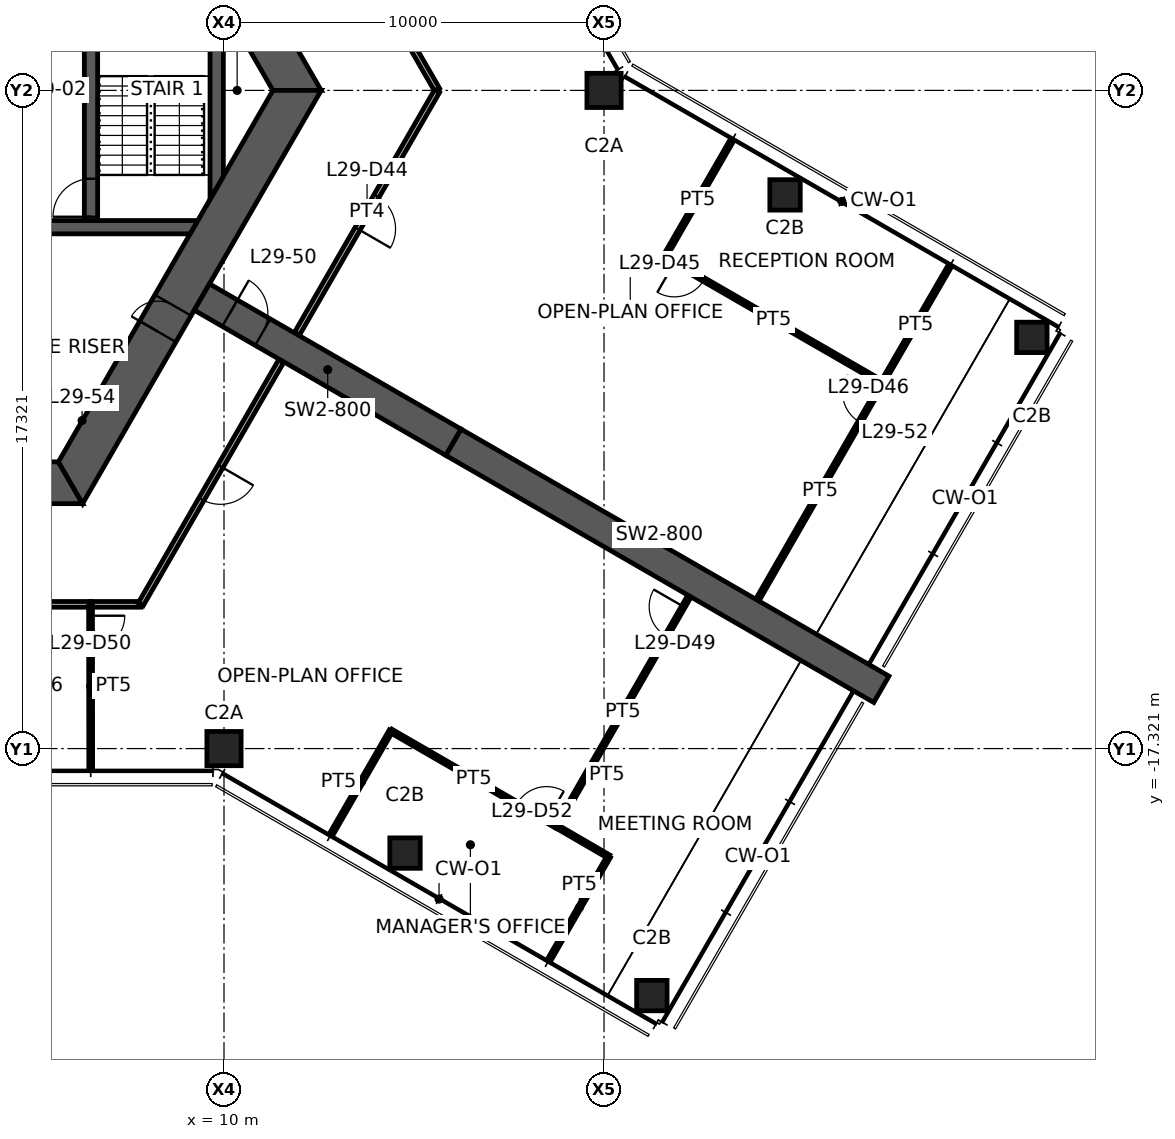
"""IFC4 building model, lengths in metres.
Left out: names, types, materials, properties, quantities, classifications, styles, units other than length and angle.
Written with IfcOpenShell. Run it as: python <this file> out.ifc"""

import sys

from ifc_helpers import new_model, si_unit, direction, frame, frame_2d, origin, origin_2d, place, context, subcontext, project, spatial, polyline, rectangle, hollow_rectangle, outline, extrude, element, fill, save


model = new_model("IFC4")
c1 = context("Model", 3, precision=1e-05, world=origin(), true_north=direction((0.0, 1.0)))
c2 = subcontext(c1, "Body", "Model", "MODEL_VIEW")
j1 = project(units=[si_unit("LENGTHUNIT", "METRE"), si_unit("PLANEANGLEUNIT", "RADIAN")], contexts=[c1])
p1 = place(None, origin())
s1 = spatial("IfcSite", under=j1, at=p1, CompositionType="ELEMENT")
p2 = place(p1, origin())
s2 = spatial("IfcBuilding", under=s1, at=p2, CompositionType="ELEMENT")
p3 = place(p2, frame((0.0, 0.0, 115.8)))
s3 = spatial("IfcBuildingStorey", under=s2, at=p3, CompositionType="ELEMENT", Elevation=115.8)
for number, where, z_axis, x_axis in (
    (1, (20.0, 0.0, 0.0), (0.0, 0.0, 1.0), (1.0, 0.0, 0.0)),
    (2, (10.0, -17.321, 0.0), (0.0, 0.0, 1.0), (1.0, 0.0, 0.0)),
):
    element("IfcColumn", number, at=place(p3, frame(where, z_axis=z_axis, x_axis=x_axis)), inside=s3, PredefinedType="COLUMN", context=c2, shape_type="SweptSolid", body=[
        extrude(hollow_rectangle(XDim=0.9, YDim=0.9, WallThickness=0.055, at=origin_2d()), origin(), (0.0, 0.0, 1.0), 3.9),
    ])
for number, where, z_axis, x_axis in (
    (3, (14.763, -20.071, 0.0), (0.0, 0.0, 1.0), (1.0, 0.0, 0.0)),
    (4, (21.258, -23.821, 0.0), (0.0, 0.0, 1.0), (1.0, 0.0, 0.0)),
    (5, (24.763, -2.75, 0.0), (0.0, 0.0, 1.0), (1.0, 0.0, 0.0)),
    (6, (31.258, -6.5, 0.0), (0.0, 0.0, 1.0), (1.0, 0.0, 0.0)),
):
    element("IfcColumn", number, at=place(p3, frame(where, z_axis=z_axis, x_axis=x_axis)), inside=s3, PredefinedType="COLUMN", context=c2, shape_type="SweptSolid", body=[
        extrude(hollow_rectangle(XDim=0.8, YDim=0.8, WallThickness=0.045, at=origin_2d()), origin(), (0.0, 0.0, 1.0), 3.9),
    ])
p4 = place(p3, frame((11.922, 0.0, 0.0), z_axis=(0.0, 0.0, 1.0), x_axis=(-0.500004296715, 0.866022923061, 0.0)))
e7 = element("IfcWall", 7, at=p4, inside=s3, PredefinedType="SHEAR", context=c2, shape_type="SweptSolid", body=[
    extrude(outline(polyline([(-0.318, -0.55), (5.835, -0.55), (6.635, -0.55), (12.24, -0.55), (11.605, 0.55), (6.635, 0.55), (5.835, 0.55), (0.318, 0.55), (-0.318, -0.55)])), origin(), (0.0, 0.0, 1.0), 3.9),
])
p5 = place(p4, frame((5.835, 0.0, 0.0)))
e8 = element("IfcOpeningElement", 8, at=p5, cuts=e7, PredefinedType="OPENING", context=c2, shape_type="SweptSolid", body=[
    extrude(rectangle(XDim=0.8, YDim=2.1, at=frame_2d((0.4, 1.05))), frame((0.0, 0.56, 0.0), z_axis=(0.0, -1.0, 0.0), x_axis=(1.0, 0.0, 0.0)), (0.0, 0.0, 1.0), 1.12),
])
p6 = place(p3, frame((-5.961, -10.325, 0.0), z_axis=(0.0, 0.0, 1.0), x_axis=(1.0, 0.0, 0.0)))
e9 = element("IfcWall", 9, at=p6, inside=s3, PredefinedType="SHEAR", context=c2, shape_type="SweptSolid", body=[
    extrude(outline(polyline([(-0.318, -0.55), (5.461, -0.55), (6.461, -0.55), (12.24, -0.55), (11.605, 0.55), (6.461, 0.55), (5.461, 0.55), (0.318, 0.55), (-0.318, -0.55)])), origin(), (0.0, 0.0, 1.0), 3.9),
])
p7 = place(p6, frame((5.461, 0.0, 0.0)))
e10 = element("IfcOpeningElement", 10, at=p7, cuts=e9, PredefinedType="OPENING", context=c2, shape_type="SweptSolid", body=[
    extrude(rectangle(XDim=1.0, YDim=2.1, at=frame_2d((0.5, 1.05))), frame((0.0, 0.56, 0.0), z_axis=(0.0, -1.0, 0.0), x_axis=(1.0, 0.0, 0.0)), (0.0, 0.0, 1.0), 1.12),
])
p8 = place(p3, frame((5.961, -10.325, 0.0), z_axis=(0.0, 0.0, 1.0), x_axis=(0.500004296715, 0.866022923061, 0.0)))
e11 = element("IfcWall", 11, at=p8, inside=s3, PredefinedType="SHEAR", context=c2, shape_type="SweptSolid", body=[
    extrude(outline(polyline([(-0.318, -0.55), (4.594, -0.55), (5.394, -0.55), (12.24, -0.55), (11.605, 0.55), (5.394, 0.55), (4.594, 0.55), (0.318, 0.55), (-0.318, -0.55)])), origin(), (0.0, 0.0, 1.0), 3.9),
])
p9 = place(p8, frame((4.594, 0.0, 0.0)))
e12 = element("IfcOpeningElement", 12, at=p9, cuts=e11, PredefinedType="OPENING", context=c2, shape_type="SweptSolid", body=[
    extrude(rectangle(XDim=0.8, YDim=2.1, at=frame_2d((0.4, 1.05))), frame((0.0, 0.56, 0.0), z_axis=(0.0, -1.0, 0.0), x_axis=(1.0, 0.0, 0.0)), (0.0, 0.0, 1.0), 1.12),
])
p10 = place(p3, frame((9.418, -5.438, 0.0), z_axis=(0.0, 0.0, 1.0), x_axis=(0.866029782078, -0.499992416496, 0.0)))
e13 = element("IfcWall", 13, at=p10, inside=s3, PredefinedType="SHEAR", context=c2, shape_type="SweptSolid", body=[
    extrude(rectangle(XDim=7.646, YDim=0.8, at=frame_2d((3.823, 0.0))), origin(), (0.0, 0.0, 1.0), 3.9),
])
p11 = place(p10, frame((0.85, 0.0, 0.0)))
e14 = element("IfcOpeningElement", 14, at=p11, cuts=e13, PredefinedType="OPENING", context=c2, shape_type="SweptSolid", body=[
    extrude(rectangle(XDim=1.0, YDim=2.1, at=frame_2d((0.5, 1.05))), frame((0.0, 0.41, 0.0), z_axis=(0.0, -1.0, 0.0), x_axis=(1.0, 0.0, 0.0)), (0.0, 0.0, 1.0), 0.82),
])
p12 = place(p3, frame((16.039, -9.26, 0.0), z_axis=(0.0, 0.0, 1.0), x_axis=(0.866024837091, -0.50000098154, 0.0)))
e15 = element("IfcWall", 15, at=p12, inside=s3, PredefinedType="SHEAR", context=c2, shape_type="SweptSolid", body=[
    extrude(rectangle(XDim=13.0, YDim=0.8, at=frame_2d((6.5, 0.0))), origin(), (0.0, 0.0, 1.0), 3.9),
])
p13 = place(p3, frame((1.425, -3.6, 0.0), z_axis=(0.0, 0.0, 1.0), x_axis=(1.0, 0.0, 0.0)))
e16 = element("IfcWall", 16, at=p13, inside=s3, PredefinedType="SHEAR", context=c2, shape_type="SweptSolid", body=[
    extrude(outline(polyline([(0.0, -0.175), (1.075, -0.175), (2.175, -0.175), (7.683, -0.175), (7.885, 0.175), (2.175, 0.175), (1.075, 0.175), (0.0, 0.175), (0.0, -0.175)])), origin(), (0.0, 0.0, 1.0), 3.9),
])
p14 = place(p13, frame((1.075, 0.0, 0.0)))
e17 = element("IfcOpeningElement", 17, at=p14, cuts=e16, PredefinedType="OPENING", context=c2, shape_type="SweptSolid", body=[
    extrude(rectangle(XDim=1.1, YDim=2.1, at=frame_2d((0.55, 1.05))), frame((0.0, 0.185, 0.0), z_axis=(0.0, -1.0, 0.0), x_axis=(1.0, 0.0, 0.0)), (0.0, 0.0, 1.0), 0.37),
])
p15 = place(p3, frame((6.5, -3.425, 0.0), z_axis=(0.0, 0.0, 1.0), x_axis=(0.0, 1.0, 0.0)))
e18 = element("IfcWall", 18, at=p15, inside=s3, PredefinedType="SHEAR", context=c2, shape_type="SweptSolid", body=[
    extrude(rectangle(XDim=6.85, YDim=0.35, at=frame_2d((3.425, 0.0))), origin(), (0.0, 0.0, 1.0), 3.9),
])
p16 = place(p15, frame((0.1, 0.0, 0.0)))
e19 = element("IfcOpeningElement", 19, at=p16, cuts=e18, PredefinedType="OPENING", context=c2, shape_type="SweptSolid", body=[
    extrude(rectangle(XDim=1.0, YDim=2.1, at=frame_2d((0.5, 1.05))), frame((0.0, 0.185, 0.0), z_axis=(0.0, -1.0, 0.0), x_axis=(1.0, 0.0, 0.0)), (0.0, 0.0, 1.0), 0.37),
])
p17 = place(p3, frame((9.808, -2.562, 0.0), z_axis=(0.0, 0.0, 1.0), x_axis=(0.0, 1.0, 0.0)))
e20 = element("IfcWall", 20, at=p17, inside=s3, PredefinedType="SHEAR", context=c2, shape_type="SweptSolid", body=[
    extrude(outline(polyline([(0.303, -0.175), (4.821, -0.175), (5.428, 0.175), (-0.303, 0.175), (0.303, -0.175)])), origin(), (0.0, 0.0, 1.0), 3.9),
])
p18 = place(p3, frame((13.334, 3.955, 0.0), z_axis=(0.0, 0.0, 1.0), x_axis=(0.499987549055, -0.866032592222, 0.0)))
e21 = element("IfcWall", 21, at=p18, inside=s3, PredefinedType="PARTITIONING", context=c2, shape_type="SweptSolid", body=[
    extrude(rectangle(XDim=4.544, YDim=0.15, at=frame_2d((2.272, 0.0))), origin(), (0.0, 0.0, 1.0), 2.95),
])
p19 = place(p3, frame((15.606, -0.02, 0.0), z_axis=(0.0, 0.0, 1.0), x_axis=(-0.499989298045, -0.866031582473, 0.0)))
e22 = element("IfcWall", 22, at=p19, inside=s3, PredefinedType="PARTITIONING", context=c2, shape_type="SweptSolid", body=[
    extrude(rectangle(XDim=7.365, YDim=0.15, at=frame_2d((3.683, 0.0))), origin(), (0.0, 0.0, 1.0), 2.95),
])
p20 = place(p19, frame((3.183, 0.0, 0.0)))
e23 = element("IfcOpeningElement", 23, at=p20, cuts=e22, PredefinedType="OPENING", context=c2, shape_type="SweptSolid", body=[
    extrude(rectangle(XDim=1.0, YDim=2.1, at=frame_2d((0.5, 1.05))), frame((0.0, 0.085, 0.0), z_axis=(0.0, -1.0, 0.0), x_axis=(1.0, 0.0, 0.0)), (0.0, 0.0, 1.0), 0.17),
])
p21 = place(p3, frame((29.075, -4.662, 0.0), z_axis=(0.0, 0.0, 1.0), x_axis=(-0.501335959492, -0.865252712056, 0.0)))
e24 = element("IfcWall", 24, at=p21, inside=s3, PredefinedType="PARTITIONING", context=c2, shape_type="SweptSolid", body=[
    extrude(rectangle(XDim=3.5, YDim=0.1, at=frame_2d((1.75, 0.0))), origin(), (0.0, 0.0, 1.0), 2.95),
])
p22 = place(p3, frame((21.592, -4.383, 0.0), z_axis=(0.0, 0.0, 1.0), x_axis=(0.500009906705, 0.86601968407, 0.0)))
e25 = element("IfcWall", 25, at=p22, inside=s3, PredefinedType="PARTITIONING", context=c2, shape_type="SweptSolid", body=[
    extrude(rectangle(XDim=3.48, YDim=0.1, at=frame_2d((1.74, 0.0))), origin(), (0.0, 0.0, 1.0), 2.95),
])
p23 = place(p3, frame((27.327, -7.69, 0.0), z_axis=(0.0, 0.0, 1.0), x_axis=(-0.866318796728, 0.499491483847, 0.0)))
e26 = element("IfcWall", 26, at=p23, inside=s3, PredefinedType="PARTITIONING", context=c2, shape_type="SweptSolid", body=[
    extrude(rectangle(XDim=6.62, YDim=0.1, at=frame_2d((3.31, 0.0))), origin(), (0.0, 0.0, 1.0), 2.95),
])
p24 = place(p23, frame((5.42, 0.0, 0.0)))
e27 = element("IfcOpeningElement", 27, at=p24, cuts=e26, PredefinedType="OPENING", context=c2, shape_type="SweptSolid", body=[
    extrude(rectangle(XDim=0.9, YDim=2.1, at=frame_2d((0.45, 1.05))), frame((0.0, 0.06, 0.0), z_axis=(0.0, -1.0, 0.0), x_axis=(1.0, 0.0, 0.0)), (0.0, 0.0, 1.0), 0.12),
])
p25 = place(p3, frame((24.043, -13.396, 0.0), z_axis=(0.0, 0.0, 1.0), x_axis=(0.498632747728, 0.866813349512, 0.0)))
e28 = element("IfcWall", 28, at=p25, inside=s3, PredefinedType="PARTITIONING", context=c2, shape_type="SweptSolid", body=[
    extrude(rectangle(XDim=6.584, YDim=0.1, at=frame_2d((3.292, 0.0))), origin(), (0.0, 0.0, 1.0), 2.95),
])
p26 = place(p25, frame((5.384, 0.0, 0.0)))
e29 = element("IfcOpeningElement", 29, at=p26, cuts=e28, PredefinedType="OPENING", context=c2, shape_type="SweptSolid", body=[
    extrude(rectangle(XDim=0.9, YDim=2.1, at=frame_2d((0.45, 1.05))), frame((0.0, 0.06, 0.0), z_axis=(0.0, -1.0, 0.0), x_axis=(1.0, 0.0, 0.0)), (0.0, 0.0, 1.0), 0.12),
])
p27 = place(p3, frame((6.498, -13.525, 0.0), z_axis=(0.0, 0.0, 1.0), x_axis=(-1.0, 0.0, 0.0)))
e30 = element("IfcWall", 30, at=p27, inside=s3, PredefinedType="PARTITIONING", context=c2, shape_type="SweptSolid", body=[
    extrude(rectangle(XDim=3.256, YDim=0.15, at=frame_2d((1.628, 0.0))), origin(), (0.0, 0.0, 1.0), 2.95),
])
p28 = place(p3, frame((7.809, -13.525, 0.0), z_axis=(0.0, 0.0, 1.0), x_axis=(-1.0, 0.0, 0.0)))
e31 = element("IfcWall", 31, at=p28, inside=s3, PredefinedType="PARTITIONING", context=c2, shape_type="SweptSolid", body=[
    extrude(rectangle(XDim=1.32, YDim=0.15, at=frame_2d((0.66, 0.0))), origin(), (0.0, 0.0, 1.0), 2.95),
])
p29 = place(p3, frame((11.503, -7.126, 0.0), z_axis=(0.0, 0.0, 1.0), x_axis=(-0.500005620463, -0.866022158784, 0.0)))
e32 = element("IfcWall", 32, at=p29, inside=s3, PredefinedType="PARTITIONING", context=c2, shape_type="SweptSolid", body=[
    extrude(rectangle(XDim=7.389, YDim=0.15, at=frame_2d((3.694, 0.0))), origin(), (0.0, 0.0, 1.0), 2.95),
])
p30 = place(p29, frame((3.194, 0.0, 0.0)))
e33 = element("IfcOpeningElement", 33, at=p30, cuts=e32, PredefinedType="OPENING", context=c2, shape_type="SweptSolid", body=[
    extrude(rectangle(XDim=1.0, YDim=2.1, at=frame_2d((0.5, 1.05))), frame((0.0, 0.085, 0.0), z_axis=(0.0, -1.0, 0.0), x_axis=(1.0, 0.0, 0.0)), (0.0, 0.0, 1.0), 0.17),
])
p31 = place(p3, frame((18.575, -22.849, 0.0), z_axis=(0.0, 0.0, 1.0), x_axis=(0.499899694197, 0.866083307622, 0.0)))
e34 = element("IfcWall", 34, at=p31, inside=s3, PredefinedType="PARTITIONING", context=c2, shape_type="SweptSolid", body=[
    extrude(rectangle(XDim=3.1, YDim=0.1, at=frame_2d((1.55, 0.0))), origin(), (0.0, 0.0, 1.0), 2.95),
])
p32 = place(p3, frame((20.125, -20.164, 0.0), z_axis=(0.0, 0.0, 1.0), x_axis=(-0.864479275947, 0.502668460775, 0.0)))
e35 = element("IfcWall", 35, at=p32, inside=s3, PredefinedType="PARTITIONING", context=c2, shape_type="SweptSolid", body=[
    extrude(rectangle(XDim=1.591, YDim=0.1, at=frame_2d((0.795, 0.0))), origin(), (0.0, 0.0, 1.0), 2.95),
])
p33 = place(p3, frame((18.751, -19.371, 0.0), z_axis=(0.0, 0.0, 1.0), x_axis=(0.499495327337, 0.866316580684, 0.0)))
e36 = element("IfcWall", 36, at=p33, inside=s3, PredefinedType="PARTITIONING", context=c2, shape_type="SweptSolid", body=[
    extrude(rectangle(XDim=6.98, YDim=0.1, at=frame_2d((3.49, 0.0))), origin(), (0.0, 0.0, 1.0), 2.95),
])
p34 = place(p33, frame((5.78, 0.0, 0.0)))
e37 = element("IfcOpeningElement", 37, at=p34, cuts=e36, PredefinedType="OPENING", context=c2, shape_type="SweptSolid", body=[
    extrude(rectangle(XDim=0.9, YDim=2.1, at=frame_2d((0.45, 1.05))), frame((0.0, 0.06, 0.0), z_axis=(0.0, -1.0, 0.0), x_axis=(1.0, 0.0, 0.0)), (0.0, 0.0, 1.0), 0.12),
])
p35 = place(p3, frame((6.488, -13.525, 0.0), z_axis=(0.0, 0.0, 1.0), x_axis=(0.00107362768, -0.999999423662, 0.0)))
e38 = element("IfcWall", 38, at=p35, inside=s3, PredefinedType="PARTITIONING", context=c2, shape_type="SweptSolid", body=[
    extrude(rectangle(XDim=4.321, YDim=0.1, at=frame_2d((2.16, 0.0))), origin(), (0.0, 0.0, 1.0), 2.95),
])
p36 = place(p35, frame((0.3, 0.0, 0.0)))
e39 = element("IfcOpeningElement", 39, at=p36, cuts=e38, PredefinedType="OPENING", context=c2, shape_type="SweptSolid", body=[
    extrude(rectangle(XDim=0.9, YDim=2.1, at=frame_2d((0.45, 1.05))), frame((0.0, 0.06, 0.0), z_axis=(0.0, -1.0, 0.0), x_axis=(1.0, 0.0, 0.0)), (0.0, 0.0, 1.0), 0.12),
])
p37 = place(p3, frame((12.842, -19.539, 0.0), z_axis=(0.0, 0.0, 1.0), x_axis=(0.499933790963, 0.866063626216, 0.0)))
e40 = element("IfcWall", 40, at=p37, inside=s3, PredefinedType="PARTITIONING", context=c2, shape_type="SweptSolid", body=[
    extrude(rectangle(XDim=3.1, YDim=0.1, at=frame_2d((1.55, 0.0))), origin(), (0.0, 0.0, 1.0), 2.95),
])
p38 = place(p3, frame((14.392, -16.854, 0.0), z_axis=(0.0, 0.0, 1.0), x_axis=(0.86601677289, -0.50001494885, 0.0)))
e41 = element("IfcWall", 41, at=p38, inside=s3, PredefinedType="PARTITIONING", context=c2, shape_type="SweptSolid", body=[
    extrude(rectangle(XDim=5.033, YDim=0.1, at=frame_2d((2.517, 0.0))), origin(), (0.0, 0.0, 1.0), 2.95),
])
p39 = place(p38, frame((3.833, 0.0, 0.0)))
e42 = element("IfcOpeningElement", 42, at=p39, cuts=e41, PredefinedType="OPENING", context=c2, shape_type="SweptSolid", body=[
    extrude(rectangle(XDim=0.9, YDim=2.1, at=frame_2d((0.45, 1.05))), frame((0.0, 0.06, 0.0), z_axis=(0.0, -1.0, 0.0), x_axis=(1.0, 0.0, 0.0)), (0.0, 0.0, 1.0), 0.12),
])
p40 = place(p9, origin())
e43 = element("IfcDoor", 43, at=p40, inside=s3, OperationType="SINGLE_SWING_LEFT", PredefinedType="DOOR", context=c2, shape_type="SweptSolid", body=[
    extrude(rectangle(XDim=0.8, YDim=2.1, at=frame_2d((0.4, 1.05))), frame((0.0, 0.025, 0.0), z_axis=(0.0, -1.0, 0.0), x_axis=(1.0, 0.0, 0.0)), (0.0, 0.0, 1.0), 0.05),
])
fill(e12, e43)
p41 = place(p16, origin())
e44 = element("IfcDoor", 44, at=p41, inside=s3, OperationType="SINGLE_SWING_LEFT", PredefinedType="DOOR", context=c2, shape_type="SweptSolid", body=[
    extrude(rectangle(XDim=1.0, YDim=2.1, at=frame_2d((0.5, 1.05))), frame((0.0, 0.025, 0.0), z_axis=(0.0, -1.0, 0.0), x_axis=(1.0, 0.0, 0.0)), (0.0, 0.0, 1.0), 0.05),
])
fill(e19, e44)
p42 = place(p11, origin())
e45 = element("IfcDoor", 45, at=p42, inside=s3, OperationType="SINGLE_SWING_LEFT", PredefinedType="DOOR", context=c2, shape_type="SweptSolid", body=[
    extrude(rectangle(XDim=1.0, YDim=2.1, at=frame_2d((0.5, 1.05))), frame((0.0, 0.025, 0.0), z_axis=(0.0, -1.0, 0.0), x_axis=(1.0, 0.0, 0.0)), (0.0, 0.0, 1.0), 0.05),
])
fill(e14, e45)
p43 = place(p20, origin())
e46 = element("IfcDoor", 46, at=p43, inside=s3, OperationType="SINGLE_SWING_RIGHT", PredefinedType="DOOR", context=c2, shape_type="SweptSolid", body=[
    extrude(rectangle(XDim=1.0, YDim=2.1, at=frame_2d((0.5, 1.05))), frame((0.0, 0.025, 0.0), z_axis=(0.0, -1.0, 0.0), x_axis=(1.0, 0.0, 0.0)), (0.0, 0.0, 1.0), 0.05),
])
fill(e23, e46)
p44 = place(p24, origin())
e47 = element("IfcDoor", 47, at=p44, inside=s3, OperationType="SINGLE_SWING_RIGHT", PredefinedType="DOOR", context=c2, shape_type="SweptSolid", body=[
    extrude(rectangle(XDim=0.9, YDim=2.1, at=frame_2d((0.45, 1.05))), frame((0.0, 0.025, 0.0), z_axis=(0.0, -1.0, 0.0), x_axis=(1.0, 0.0, 0.0)), (0.0, 0.0, 1.0), 0.05),
])
fill(e27, e47)
p45 = place(p26, origin())
e48 = element("IfcDoor", 48, at=p45, inside=s3, OperationType="SINGLE_SWING_RIGHT", PredefinedType="DOOR", context=c2, shape_type="SweptSolid", body=[
    extrude(rectangle(XDim=0.9, YDim=2.1, at=frame_2d((0.45, 1.05))), frame((0.0, 0.025, 0.0), z_axis=(0.0, -1.0, 0.0), x_axis=(1.0, 0.0, 0.0)), (0.0, 0.0, 1.0), 0.05),
])
fill(e29, e48)
p46 = place(p30, origin())
e49 = element("IfcDoor", 49, at=p46, inside=s3, OperationType="SINGLE_SWING_LEFT", PredefinedType="DOOR", context=c2, shape_type="SweptSolid", body=[
    extrude(rectangle(XDim=1.0, YDim=2.1, at=frame_2d((0.5, 1.05))), frame((0.0, 0.025, 0.0), z_axis=(0.0, -1.0, 0.0), x_axis=(1.0, 0.0, 0.0)), (0.0, 0.0, 1.0), 0.05),
])
fill(e33, e49)
p47 = place(p34, origin())
e50 = element("IfcDoor", 50, at=p47, inside=s3, OperationType="SINGLE_SWING_RIGHT", PredefinedType="DOOR", context=c2, shape_type="SweptSolid", body=[
    extrude(rectangle(XDim=0.9, YDim=2.1, at=frame_2d((0.45, 1.05))), frame((0.0, 0.025, 0.0), z_axis=(0.0, -1.0, 0.0), x_axis=(1.0, 0.0, 0.0)), (0.0, 0.0, 1.0), 0.05),
])
fill(e37, e50)
p48 = place(p36, origin())
e51 = element("IfcDoor", 51, at=p48, inside=s3, OperationType="SINGLE_SWING_LEFT", PredefinedType="DOOR", context=c2, shape_type="SweptSolid", body=[
    extrude(rectangle(XDim=0.9, YDim=2.1, at=frame_2d((0.45, 1.05))), frame((0.0, 0.025, 0.0), z_axis=(0.0, -1.0, 0.0), x_axis=(1.0, 0.0, 0.0)), (0.0, 0.0, 1.0), 0.05),
])
fill(e39, e51)
p49 = place(p39, origin())
e52 = element("IfcDoor", 52, at=p49, inside=s3, OperationType="SINGLE_SWING_RIGHT", PredefinedType="DOOR", context=c2, shape_type="SweptSolid", body=[
    extrude(rectangle(XDim=0.9, YDim=2.1, at=frame_2d((0.45, 1.05))), frame((0.0, 0.025, 0.0), z_axis=(0.0, -1.0, 0.0), x_axis=(1.0, 0.0, 0.0)), (0.0, 0.0, 1.0), 0.05),
])
fill(e42, e52)
save(model, sys.argv[1])
